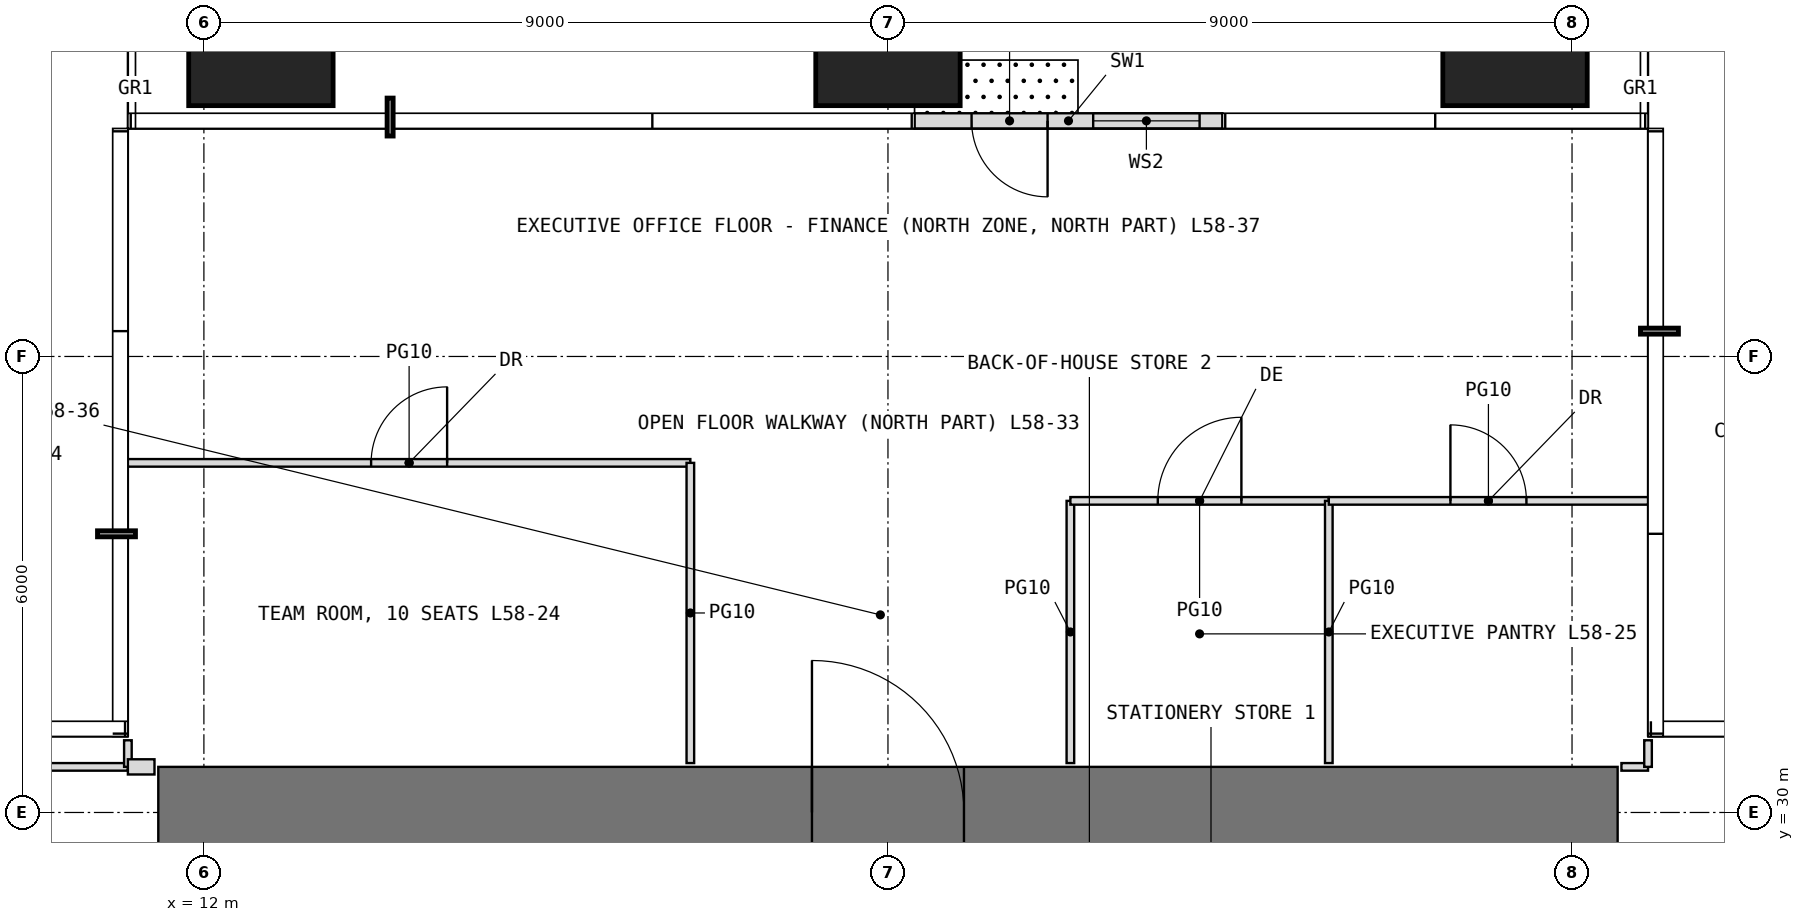
"""IFC4 building model, lengths in metres.
Left out: names, types, materials, properties, quantities, classifications, styles, units other than length and angle.
Written with IfcOpenShell. Run it as: python <this file> out.ifc"""

import sys

from ifc_helpers import new_model, si_unit, direction, frame, frame_2d, origin, origin_2d, place, context, subcontext, project, spatial, rectangle, extrude, element, fill, save


model = new_model("IFC4")
c1 = context("Model", 3, precision=1e-05, world=origin(), true_north=direction((0.0, 1.0)))
c2 = subcontext(c1, "Body", "Model", "MODEL_VIEW")
j1 = project(units=[si_unit("LENGTHUNIT", "METRE"), si_unit("PLANEANGLEUNIT", "RADIAN")], contexts=[c1])
p1 = place(None, origin())
s1 = spatial("IfcSite", under=j1, at=p1, CompositionType="ELEMENT")
p2 = place(p1, origin())
s2 = spatial("IfcBuilding", under=s1, at=p2, CompositionType="ELEMENT")
p3 = place(p2, frame((0.0, 0.0, 244.0)))
s3 = spatial("IfcBuildingStorey", under=s2, at=p3, CompositionType="ELEMENT", Elevation=244.0)
for number, where, z_axis, x_axis in (
    (1, (12.75, 40.25, 0.0), (0.0, 0.0, 1.0), (1.0, 0.0, 0.0)),
    (2, (21.0, 40.25, 0.0), (0.0, 0.0, 1.0), (1.0, 0.0, 0.0)),
    (3, (29.25, 40.25, 0.0), (0.0, 0.0, 1.0), (1.0, 0.0, 0.0)),
):
    element("IfcColumn", number, at=place(p3, frame(where, z_axis=z_axis, x_axis=x_axis)), inside=s3, PredefinedType="COLUMN", context=c2, shape_type="SweptSolid", body=[
        extrude(rectangle(XDim=1.9, YDim=1.9, at=origin_2d()), origin(), (0.0, 0.0, 1.0), 4.2),
    ])
p4 = place(p3, frame((25.4, 39.1, 0.0), z_axis=(0.0, 0.0, 1.0), x_axis=(-1.0, 0.0, 0.0)))
e4 = element("IfcWall", 4, at=p4, inside=s3, PredefinedType="USERDEFINED", context=c2, shape_type="SweptSolid", body=[
    extrude(rectangle(XDim=4.05, YDim=0.2, at=frame_2d((2.025, 0.0))), origin(), (0.0, 0.0, 1.0), 3.95),
])
p5 = place(p4, frame((2.3, 0.0, 0.0)))
e5 = element("IfcOpeningElement", 5, at=p5, cuts=e4, PredefinedType="OPENING", context=c2, shape_type="SweptSolid", body=[
    extrude(rectangle(XDim=1.0, YDim=2.4, at=frame_2d((0.5, 1.2))), frame((0.0, 0.11, 0.0), z_axis=(0.0, -1.0, 0.0), x_axis=(1.0, 0.0, 0.0)), (0.0, 0.0, 1.0), 0.22),
])
p6 = place(p4, frame((0.3, 0.0, 0.3)))
e6 = element("IfcOpeningElement", 6, at=p6, cuts=e4, PredefinedType="OPENING", context=c2, shape_type="SweptSolid", body=[
    extrude(rectangle(XDim=1.4, YDim=2.7, at=frame_2d((0.7, 1.35))), frame((0.0, 0.11, 0.0), z_axis=(0.0, -1.0, 0.0), x_axis=(1.0, 0.0, 0.0)), (0.0, 0.0, 1.0), 0.22),
])
p7 = place(p3, frame((11.4, 30.0, -0.05), z_axis=(0.0, 0.0, 1.0), x_axis=(1.0, 0.0, 0.0)))
e7 = element("IfcWall", 7, at=p7, inside=s3, PredefinedType="SHEAR", context=c2, shape_type="SweptSolid", body=[
    extrude(rectangle(XDim=19.2, YDim=1.2, at=frame_2d((9.6, 0.0))), origin(), (0.0, 0.0, 1.0), 4.2),
])
p8 = place(p7, frame((8.6, 0.0, 0.05)))
e8 = element("IfcOpeningElement", 8, at=p8, cuts=e7, PredefinedType="OPENING", context=c2, shape_type="SweptSolid", body=[
    extrude(rectangle(XDim=2.0, YDim=2.2, at=frame_2d((1.0, 1.1))), frame((0.0, 0.61, 0.0), z_axis=(0.0, -1.0, 0.0), x_axis=(1.0, 0.0, 0.0)), (0.0, 0.0, 1.0), 1.22),
])
p9 = place(p3, frame((8.0, 30.6, 0.0), z_axis=(0.0, 0.0, 1.0), x_axis=(1.0, 0.0, 0.0)))
e9 = element("IfcWall", 9, at=p9, inside=s3, PredefinedType="PARTITIONING", context=c2, shape_type="SweptSolid", body=[
    extrude(rectangle(XDim=3.0, YDim=0.1, at=frame_2d((1.5, 0.0))), origin(), (0.0, 0.0, 1.0), 3.95),
])
p10 = place(p3, frame((11.0, 30.6, 0.0), z_axis=(0.0, 0.0, 1.0), x_axis=(0.0, 1.0, 0.0)))
e10 = element("IfcWall", 10, at=p10, inside=s3, PredefinedType="PARTITIONING", context=c2, shape_type="SweptSolid", body=[
    extrude(rectangle(XDim=0.35, YDim=0.1, at=frame_2d((0.175, 0.0))), origin(), (0.0, 0.0, 1.0), 3.95),
])
p11 = place(p3, frame((11.0, 30.6, 0.0), z_axis=(0.0, 0.0, 1.0), x_axis=(1.0, 0.0, 0.0)))
e11 = element("IfcWall", 11, at=p11, inside=s3, PredefinedType="PARTITIONING", context=c2, shape_type="SweptSolid", body=[
    extrude(rectangle(XDim=0.35, YDim=0.2, at=frame_2d((0.175, 0.0))), origin(), (0.0, 0.0, 1.0), 3.95),
])
p12 = place(p3, frame((11.0, 34.6, 0.0), z_axis=(0.0, 0.0, 1.0), x_axis=(1.0, 0.0, 0.0)))
e12 = element("IfcWall", 12, at=p12, inside=s3, PredefinedType="PARTITIONING", context=c2, shape_type="SweptSolid", body=[
    extrude(rectangle(XDim=7.4, YDim=0.1, at=frame_2d((3.7, 0.0))), origin(), (0.0, 0.0, 1.0), 3.95),
])
p13 = place(p12, frame((3.2, 0.0, 0.0)))
e13 = element("IfcOpeningElement", 13, at=p13, cuts=e12, PredefinedType="OPENING", context=c2, shape_type="SweptSolid", body=[
    extrude(rectangle(XDim=1.0, YDim=2.2, at=frame_2d((0.5, 1.1))), frame((0.0, 0.06, 0.0), z_axis=(0.0, -1.0, 0.0), x_axis=(1.0, 0.0, 0.0)), (0.0, 0.0, 1.0), 0.12),
])
p14 = place(p3, frame((18.4, 30.65, 0.0), z_axis=(0.0, 0.0, 1.0), x_axis=(0.0, 1.0, 0.0)))
e14 = element("IfcWall", 14, at=p14, inside=s3, PredefinedType="PARTITIONING", context=c2, shape_type="SweptSolid", body=[
    extrude(rectangle(XDim=3.95, YDim=0.1, at=frame_2d((1.975, 0.0))), origin(), (0.0, 0.0, 1.0), 3.95),
])
p15 = place(p3, frame((23.4, 30.65, 0.0), z_axis=(0.0, 0.0, 1.0), x_axis=(0.0, 1.0, 0.0)))
e15 = element("IfcWall", 15, at=p15, inside=s3, PredefinedType="PARTITIONING", context=c2, shape_type="SweptSolid", body=[
    extrude(rectangle(XDim=3.45, YDim=0.1, at=frame_2d((1.725, 0.0))), origin(), (0.0, 0.0, 1.0), 3.95),
])
p16 = place(p3, frame((23.4, 34.1, 0.0), z_axis=(0.0, 0.0, 1.0), x_axis=(1.0, 0.0, 0.0)))
e16 = element("IfcWall", 16, at=p16, inside=s3, PredefinedType="PARTITIONING", context=c2, shape_type="SweptSolid", body=[
    extrude(rectangle(XDim=3.4, YDim=0.1, at=frame_2d((1.7, 0.0))), origin(), (0.0, 0.0, 1.0), 3.95),
])
p17 = place(p16, frame((1.15, 0.0, 0.0)))
e17 = element("IfcOpeningElement", 17, at=p17, cuts=e16, PredefinedType="OPENING", context=c2, shape_type="SweptSolid", body=[
    extrude(rectangle(XDim=1.1, YDim=2.3, at=frame_2d((0.55, 1.15))), frame((0.0, 0.06, 0.0), z_axis=(0.0, -1.0, 0.0), x_axis=(1.0, 0.0, 0.0)), (0.0, 0.0, 1.0), 0.12),
])
p18 = place(p3, frame((26.8, 30.65, 0.0), z_axis=(0.0, 0.0, 1.0), x_axis=(0.0, 1.0, 0.0)))
e18 = element("IfcWall", 18, at=p18, inside=s3, PredefinedType="PARTITIONING", context=c2, shape_type="SweptSolid", body=[
    extrude(rectangle(XDim=3.45, YDim=0.1, at=frame_2d((1.725, 0.0))), origin(), (0.0, 0.0, 1.0), 3.95),
])
p19 = place(p3, frame((26.8, 34.1, 0.0), z_axis=(0.0, 0.0, 1.0), x_axis=(1.0, 0.0, 0.0)))
e19 = element("IfcWall", 19, at=p19, inside=s3, PredefinedType="PARTITIONING", context=c2, shape_type="SweptSolid", body=[
    extrude(rectangle(XDim=4.2, YDim=0.1, at=frame_2d((2.1, 0.0))), origin(), (0.0, 0.0, 1.0), 3.95),
])
p20 = place(p19, frame((1.6, 0.0, 0.0)))
e20 = element("IfcOpeningElement", 20, at=p20, cuts=e19, PredefinedType="OPENING", context=c2, shape_type="SweptSolid", body=[
    extrude(rectangle(XDim=1.0, YDim=2.2, at=frame_2d((0.5, 1.1))), frame((0.0, 0.06, 0.0), z_axis=(0.0, -1.0, 0.0), x_axis=(1.0, 0.0, 0.0)), (0.0, 0.0, 1.0), 0.12),
])
p21 = place(p3, frame((30.65, 30.6, 0.0), z_axis=(0.0, 0.0, 1.0), x_axis=(1.0, 0.0, 0.0)))
e21 = element("IfcWall", 21, at=p21, inside=s3, PredefinedType="PARTITIONING", context=c2, shape_type="SweptSolid", body=[
    extrude(rectangle(XDim=0.35, YDim=0.1, at=frame_2d((0.175, 0.0))), origin(), (0.0, 0.0, 1.0), 3.95),
])
p22 = place(p3, frame((31.0, 30.6, 0.0), z_axis=(0.0, 0.0, 1.0), x_axis=(0.0, 1.0, 0.0)))
e22 = element("IfcWall", 22, at=p22, inside=s3, PredefinedType="PARTITIONING", context=c2, shape_type="SweptSolid", body=[
    extrude(rectangle(XDim=0.35, YDim=0.1, at=frame_2d((0.175, 0.0))), origin(), (0.0, 0.0, 1.0), 3.95),
])
p23 = place(p5, origin())
e23 = element("IfcDoor", 23, at=p23, inside=s3, OperationType="SINGLE_SWING_LEFT", PredefinedType="DOOR", context=c2, shape_type="SweptSolid", body=[
    extrude(rectangle(XDim=1.0, YDim=2.4, at=frame_2d((0.5, 1.2))), frame((0.0, 0.025, 0.0), z_axis=(0.0, -1.0, 0.0), x_axis=(1.0, 0.0, 0.0)), (0.0, 0.0, 1.0), 0.05),
])
fill(e5, e23)
p24 = place(p6, origin())
e24 = element("IfcWindow", 24, at=p24, inside=s3, PartitioningType="SINGLE_PANEL", PredefinedType="WINDOW", context=c2, shape_type="SweptSolid", body=[
    extrude(rectangle(XDim=1.4, YDim=2.7, at=frame_2d((0.7, 1.35))), frame((0.0, 0.03, 0.0), z_axis=(0.0, -1.0, 0.0), x_axis=(1.0, 0.0, 0.0)), (0.0, 0.0, 1.0), 0.06),
])
fill(e6, e24)
p25 = place(p8, origin())
e25 = element("IfcDoor", 25, at=p25, inside=s3, OperationType="DOUBLE_DOOR_SINGLE_SWING", PredefinedType="DOOR", context=c2, shape_type="SweptSolid", body=[
    extrude(rectangle(XDim=2.0, YDim=2.2, at=frame_2d((1.0, 1.1))), frame((0.0, 0.025, 0.0), z_axis=(0.0, -1.0, 0.0), x_axis=(1.0, 0.0, 0.0)), (0.0, 0.0, 1.0), 0.05),
])
fill(e8, e25)
p26 = place(p13, origin())
e26 = element("IfcDoor", 26, at=p26, inside=s3, OperationType="SINGLE_SWING_RIGHT", PredefinedType="DOOR", context=c2, shape_type="SweptSolid", body=[
    extrude(rectangle(XDim=1.0, YDim=2.2, at=frame_2d((0.5, 1.1))), frame((0.0, 0.025, 0.0), z_axis=(0.0, -1.0, 0.0), x_axis=(1.0, 0.0, 0.0)), (0.0, 0.0, 1.0), 0.05),
])
fill(e13, e26)
p27 = place(p17, origin())
e27 = element("IfcDoor", 27, at=p27, inside=s3, OperationType="SINGLE_SWING_RIGHT", PredefinedType="DOOR", context=c2, shape_type="SweptSolid", body=[
    extrude(rectangle(XDim=1.1, YDim=2.3, at=frame_2d((0.55, 1.15))), frame((0.0, 0.025, 0.0), z_axis=(0.0, -1.0, 0.0), x_axis=(1.0, 0.0, 0.0)), (0.0, 0.0, 1.0), 0.05),
])
fill(e17, e27)
p28 = place(p20, origin())
e28 = element("IfcDoor", 28, at=p28, inside=s3, OperationType="SINGLE_SWING_LEFT", PredefinedType="DOOR", context=c2, shape_type="SweptSolid", body=[
    extrude(rectangle(XDim=1.0, YDim=2.2, at=frame_2d((0.5, 1.1))), frame((0.0, 0.025, 0.0), z_axis=(0.0, -1.0, 0.0), x_axis=(1.0, 0.0, 0.0)), (0.0, 0.0, 1.0), 0.05),
])
fill(e20, e28)
save(model, sys.argv[1])
